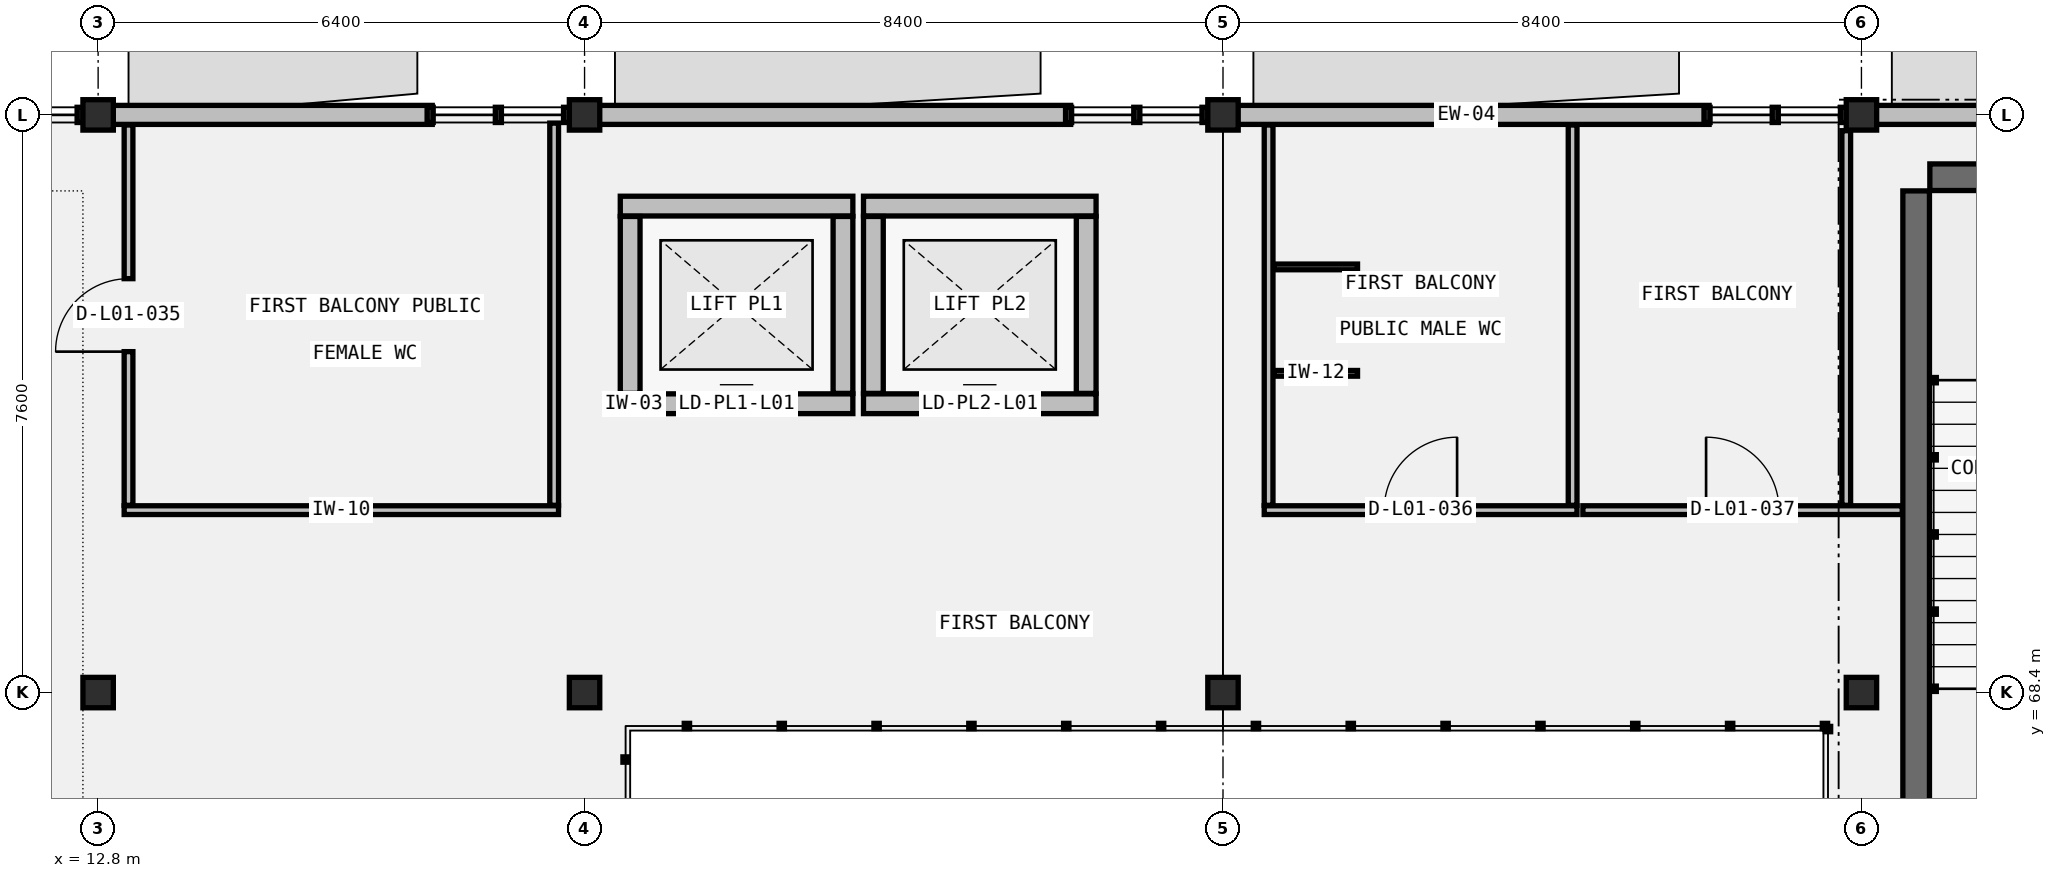
"""IFC4 building model, lengths in metres.
Left out: names, types, materials, properties, quantities, classifications, styles, units other than length and angle.
Written with IfcOpenShell. Run it as: python <this file> out.ifc"""

import sys

from ifc_helpers import new_model, si_unit, direction, frame, frame_2d, origin, origin_2d, place, context, subcontext, project, spatial, rectangle, i_section, extrude, element, fill, save


model = new_model("IFC4")
c1 = context("Model", 3, precision=1e-05, world=origin(), true_north=direction((0.0, 1.0)))
c2 = subcontext(c1, "Body", "Model", "MODEL_VIEW")
j1 = project(units=[si_unit("LENGTHUNIT", "METRE"), si_unit("PLANEANGLEUNIT", "RADIAN")], contexts=[c1])
p1 = place(None, origin())
s1 = spatial("IfcSite", under=j1, at=p1, CompositionType="ELEMENT")
p2 = place(p1, origin())
s2 = spatial("IfcBuilding", under=s1, at=p2, CompositionType="ELEMENT")
p3 = place(p2, frame((0.0, 0.0, 5.4)))
s3 = spatial("IfcBuildingStorey", under=s2, at=p3, CompositionType="ELEMENT", Elevation=5.4)
for number, where, z_axis, x_axis in (
    (1, (12.8, 68.4, 0.0), (0.0, 0.0, 1.0), (1.0, 0.0, 0.0)),
    (2, (12.8, 76.0, 0.0), (0.0, 0.0, 1.0), (1.0, 0.0, 0.0)),
    (3, (19.2, 68.4, 0.0), (0.0, 0.0, 1.0), (1.0, 0.0, 0.0)),
    (4, (19.2, 76.0, 0.0), (0.0, 0.0, 1.0), (1.0, 0.0, 0.0)),
    (5, (27.6, 68.4, 0.0), (0.0, 0.0, 1.0), (1.0, 0.0, 0.0)),
    (6, (27.6, 76.0, 0.0), (0.0, 0.0, 1.0), (1.0, 0.0, 0.0)),
    (7, (36.0, 68.4, 0.0), (0.0, 0.0, 1.0), (1.0, 0.0, 0.0)),
    (8, (36.0, 76.0, 0.0), (0.0, 0.0, 1.0), (1.0, 0.0, 0.0)),
):
    element("IfcColumn", number, at=place(p3, frame(where, z_axis=z_axis, x_axis=x_axis)), inside=s3, PredefinedType="COLUMN", context=c2, shape_type="SweptSolid", body=[
        extrude(i_section(OverallWidth=0.4, OverallDepth=0.4, WebThickness=0.013, FlangeThickness=0.021, FilletRadius=0.022, at=origin_2d()), origin(), (0.0, 0.0, 1.0), 4.6),
    ])
p4 = place(p3, frame((40.2, 75.18, 0.0), z_axis=(0.0, 0.0, 1.0), x_axis=(-1.0, 0.0, 0.0)))
e9 = element("IfcWall", 9, at=p4, inside=s3, PredefinedType="SHEAR", context=c2, shape_type="SweptSolid", body=[
    extrude(rectangle(XDim=3.3, YDim=0.35, at=frame_2d((1.65, 0.0))), origin(), (0.0, 0.0, 1.0), 4.36),
])
p5 = place(p3, frame((36.72, 75.0, 0.0), z_axis=(0.0, 0.0, 1.0), x_axis=(0.0, -1.0, 0.0)))
e10 = element("IfcWall", 10, at=p5, inside=s3, PredefinedType="SHEAR", context=c2, shape_type="SweptSolid", body=[
    extrude(rectangle(XDim=8.15, YDim=0.35, at=frame_2d((4.075, 0.0))), origin(), (0.0, 0.0, 1.0), 4.36),
])
p6 = place(p3, frame((12.81, 76.0, 0.0), z_axis=(0.0, 0.0, 1.0), x_axis=(1.0, 0.0, 0.0)))
e11 = element("IfcWall", 11, at=p6, inside=s3, PredefinedType="STANDARD", context=c2, shape_type="SweptSolid", body=[
    extrude(rectangle(XDim=4.386, YDim=0.25, at=frame_2d((2.193, 0.0))), origin(), (0.0, 0.0, 1.0), 3.438),
])
for number, where, z_axis, x_axis in (
    (12, (19.21, 76.0, 0.0), (0.0, 0.0, 1.0), (1.0, 0.0, 0.0)),
    (13, (27.61, 76.0, 0.0), (0.0, 0.0, 1.0), (1.0, 0.0, 0.0)),
):
    element("IfcWall", number, at=place(p3, frame(where, z_axis=z_axis, x_axis=x_axis)), inside=s3, PredefinedType="STANDARD", context=c2, shape_type="SweptSolid", body=[
        extrude(rectangle(XDim=6.386, YDim=0.25, at=frame_2d((3.193, 0.0))), origin(), (0.0, 0.0, 1.0), 3.438),
    ])
p7 = place(p3, frame((36.01, 76.0, 0.0), z_axis=(0.0, 0.0, 1.0), x_axis=(1.0, 0.0, 0.0)))
e14 = element("IfcWall", 14, at=p7, inside=s3, PredefinedType="STANDARD", context=c2, shape_type="SweptSolid", body=[
    extrude(rectangle(XDim=6.186, YDim=0.25, at=frame_2d((3.093, 0.0))), origin(), (0.0, 0.0, 1.0), 3.85),
])
p8 = place(p3, frame((19.67, 72.2, 0.0), z_axis=(0.0, 0.0, 1.0), x_axis=(1.0, 0.0, 0.0)))
e15 = element("IfcWall", 15, at=p8, inside=s3, PredefinedType="STANDARD", context=c2, shape_type="SweptSolid", body=[
    extrude(rectangle(XDim=3.06, YDim=0.26, at=frame_2d((1.53, 0.0))), origin(), (0.0, 0.0, 1.0), 4.36),
])
p9 = place(p8, frame((0.955, 0.0, 0.0)))
e16 = element("IfcOpeningElement", 16, at=p9, cuts=e15, PredefinedType="OPENING", context=c2, shape_type="SweptSolid", body=[
    extrude(rectangle(XDim=1.15, YDim=2.15, at=frame_2d((0.575, 1.075))), frame((0.0, 0.14, 0.0), z_axis=(0.0, -1.0, 0.0), x_axis=(1.0, 0.0, 0.0)), (0.0, 0.0, 1.0), 0.28),
])
p10 = place(p3, frame((19.67, 74.8, 0.0), z_axis=(0.0, 0.0, 1.0), x_axis=(1.0, 0.0, 0.0)))
e17 = element("IfcWall", 17, at=p10, inside=s3, PredefinedType="STANDARD", context=c2, shape_type="SweptSolid", body=[
    extrude(rectangle(XDim=3.06, YDim=0.26, at=frame_2d((1.53, 0.0))), origin(), (0.0, 0.0, 1.0), 4.36),
])
for number, where, z_axis, x_axis in (
    (18, (19.8, 72.336, 0.0), (0.0, 0.0, 1.0), (0.0, 1.0, 0.0)),
    (19, (22.6, 72.336, 0.0), (0.0, 0.0, 1.0), (0.0, 1.0, 0.0)),
):
    element("IfcWall", number, at=place(p3, frame(where, z_axis=z_axis, x_axis=x_axis)), inside=s3, PredefinedType="STANDARD", context=c2, shape_type="SweptSolid", body=[
        extrude(rectangle(XDim=2.328, YDim=0.26, at=frame_2d((1.164, 0.0))), origin(), (0.0, 0.0, 1.0), 4.36),
    ])
p11 = place(p3, frame((22.87, 72.2, 0.0), z_axis=(0.0, 0.0, 1.0), x_axis=(1.0, 0.0, 0.0)))
e20 = element("IfcWall", 20, at=p11, inside=s3, PredefinedType="STANDARD", context=c2, shape_type="SweptSolid", body=[
    extrude(rectangle(XDim=3.06, YDim=0.26, at=frame_2d((1.53, 0.0))), origin(), (0.0, 0.0, 1.0), 4.36),
])
p12 = place(p11, frame((0.92, 0.0, 0.0)))
e21 = element("IfcOpeningElement", 21, at=p12, cuts=e20, PredefinedType="OPENING", context=c2, shape_type="SweptSolid", body=[
    extrude(rectangle(XDim=1.22, YDim=2.2, at=frame_2d((0.61, 1.1))), frame((0.0, 0.14, 0.0), z_axis=(0.0, -1.0, 0.0), x_axis=(1.0, 0.0, 0.0)), (0.0, 0.0, 1.0), 0.28),
])
p13 = place(p3, frame((22.87, 74.8, 0.0), z_axis=(0.0, 0.0, 1.0), x_axis=(1.0, 0.0, 0.0)))
e22 = element("IfcWall", 22, at=p13, inside=s3, PredefinedType="STANDARD", context=c2, shape_type="SweptSolid", body=[
    extrude(rectangle(XDim=3.06, YDim=0.26, at=frame_2d((1.53, 0.0))), origin(), (0.0, 0.0, 1.0), 4.36),
])
for number, where, z_axis, x_axis in (
    (23, (23.0, 72.336, 0.0), (0.0, 0.0, 1.0), (0.0, 1.0, 0.0)),
    (24, (25.8, 72.336, 0.0), (0.0, 0.0, 1.0), (0.0, 1.0, 0.0)),
):
    element("IfcWall", number, at=place(p3, frame(where, z_axis=z_axis, x_axis=x_axis)), inside=s3, PredefinedType="STANDARD", context=c2, shape_type="SweptSolid", body=[
        extrude(rectangle(XDim=2.328, YDim=0.26, at=frame_2d((1.164, 0.0))), origin(), (0.0, 0.0, 1.0), 4.36),
    ])
p14 = place(p3, frame((13.143, 70.8, 0.0), z_axis=(0.0, 0.0, 1.0), x_axis=(1.0, 0.0, 0.0)))
e25 = element("IfcWall", 25, at=p14, inside=s3, PredefinedType="PARTITIONING", context=c2, shape_type="SweptSolid", body=[
    extrude(rectangle(XDim=5.715, YDim=0.115, at=frame_2d((2.857, 0.0))), origin(), (0.0, 0.0, 1.0), 3.938),
])
p15 = place(p3, frame((13.2, 70.864, 0.0), z_axis=(0.0, 0.0, 1.0), x_axis=(0.0, 1.0, 0.0)))
e26 = element("IfcWall", 26, at=p15, inside=s3, PredefinedType="PARTITIONING", context=c2, shape_type="SweptSolid", body=[
    extrude(rectangle(XDim=5.003, YDim=0.115, at=frame_2d((2.502, 0.0))), origin(), (0.0, 0.0, 1.0), 3.438),
])
p16 = place(p15, frame((2.022, 0.0, 0.0)))
e27 = element("IfcOpeningElement", 27, at=p16, cuts=e26, PredefinedType="OPENING", context=c2, shape_type="SweptSolid", body=[
    extrude(rectangle(XDim=0.96, YDim=2.08, at=frame_2d((0.48, 1.04))), frame((0.0, 0.067, 0.0), z_axis=(0.0, -1.0, 0.0), x_axis=(1.0, 0.0, 0.0)), (0.0, 0.0, 1.0), 0.135),
])
p17 = place(p3, frame((18.8, 70.864, 0.0), z_axis=(0.0, 0.0, 1.0), x_axis=(0.0, 1.0, 0.0)))
e28 = element("IfcWall", 28, at=p17, inside=s3, PredefinedType="PARTITIONING", context=c2, shape_type="SweptSolid", body=[
    extrude(rectangle(XDim=5.029, YDim=0.115, at=frame_2d((2.514, 0.0))), origin(), (0.0, 0.0, 1.0), 3.438),
])
p18 = place(p3, frame((28.143, 70.8, 0.0), z_axis=(0.0, 0.0, 1.0), x_axis=(1.0, 0.0, 0.0)))
e29 = element("IfcWall", 29, at=p18, inside=s3, PredefinedType="PARTITIONING", context=c2, shape_type="SweptSolid", body=[
    extrude(rectangle(XDim=4.115, YDim=0.115, at=frame_2d((2.058, 0.0))), origin(), (0.0, 0.0, 1.0), 3.938),
])
p19 = place(p18, frame((1.577, 0.0, 0.0)))
e30 = element("IfcOpeningElement", 30, at=p19, cuts=e29, PredefinedType="OPENING", context=c2, shape_type="SweptSolid", body=[
    extrude(rectangle(XDim=0.96, YDim=2.08, at=frame_2d((0.48, 1.04))), frame((0.0, 0.067, 0.0), z_axis=(0.0, -1.0, 0.0), x_axis=(1.0, 0.0, 0.0)), (0.0, 0.0, 1.0), 0.135),
])
for number, where, z_axis, x_axis in (
    (31, (28.2, 70.864, 0.0), (0.0, 0.0, 1.0), (0.0, 1.0, 0.0)),
    (32, (32.2, 70.864, 0.0), (0.0, 0.0, 1.0), (0.0, 1.0, 0.0)),
):
    element("IfcWall", number, at=place(p3, frame(where, z_axis=z_axis, x_axis=x_axis)), inside=s3, PredefinedType="PARTITIONING", context=c2, shape_type="SweptSolid", body=[
        extrude(rectangle(XDim=5.003, YDim=0.115, at=frame_2d((2.502, 0.0))), origin(), (0.0, 0.0, 1.0), 3.85),
    ])
p20 = place(p3, frame((32.335, 70.8, 0.0), z_axis=(0.0, 0.0, 1.0), x_axis=(1.0, 0.0, 0.0)))
e33 = element("IfcWall", 33, at=p20, inside=s3, PredefinedType="PARTITIONING", context=c2, shape_type="SweptSolid", body=[
    extrude(rectangle(XDim=4.202, YDim=0.115, at=frame_2d((2.101, 0.0))), origin(), (0.0, 0.0, 1.0), 3.938),
])
p21 = place(p20, frame((1.621, 0.0, 0.0)))
e34 = element("IfcOpeningElement", 34, at=p21, cuts=e33, PredefinedType="OPENING", context=c2, shape_type="SweptSolid", body=[
    extrude(rectangle(XDim=0.96, YDim=2.08, at=frame_2d((0.48, 1.04))), frame((0.0, 0.067, 0.0), z_axis=(0.0, -1.0, 0.0), x_axis=(1.0, 0.0, 0.0)), (0.0, 0.0, 1.0), 0.135),
])
p22 = place(p3, frame((35.8, 70.864, 0.0), z_axis=(0.0, 0.0, 1.0), x_axis=(0.0, 1.0, 0.0)))
e35 = element("IfcWall", 35, at=p22, inside=s3, PredefinedType="PARTITIONING", context=c2, shape_type="SweptSolid", body=[
    extrude(rectangle(XDim=4.928, YDim=0.115, at=frame_2d((2.464, 0.0))), origin(), (0.0, 0.0, 1.0), 3.85),
])
for number, where, z_axis, x_axis in (
    (36, (28.27, 72.6, 0.0), (0.0, 0.0, 1.0), (1.0, 0.0, 0.0)),
    (37, (28.27, 74.0, 0.0), (0.0, 0.0, 1.0), (1.0, 0.0, 0.0)),
):
    element("IfcWall", number, at=place(p3, frame(where, z_axis=z_axis, x_axis=x_axis)), inside=s3, PredefinedType="PARTITIONING", context=c2, shape_type="SweptSolid", body=[
        extrude(rectangle(XDim=1.1, YDim=0.075, at=frame_2d((0.55, 0.0))), origin(), (0.0, 0.0, 1.0), 2.05),
    ])
p23 = place(p9, origin())
e38 = element("IfcDoor", 38, at=p23, inside=s3, OperationType="SLIDING_TO_LEFT", PredefinedType="DOOR", context=c2, shape_type="SweptSolid", body=[
    extrude(rectangle(XDim=1.15, YDim=2.15, at=frame_2d((0.575, 1.075))), frame((0.0, 0.025, 0.0), z_axis=(0.0, -1.0, 0.0), x_axis=(1.0, 0.0, 0.0)), (0.0, 0.0, 1.0), 0.05),
])
fill(e16, e38)
p24 = place(p12, origin())
e39 = element("IfcDoor", 39, at=p24, inside=s3, OperationType="SLIDING_TO_RIGHT", PredefinedType="DOOR", context=c2, shape_type="SweptSolid", body=[
    extrude(rectangle(XDim=1.22, YDim=2.2, at=frame_2d((0.61, 1.1))), frame((0.0, 0.025, 0.0), z_axis=(0.0, -1.0, 0.0), x_axis=(1.0, 0.0, 0.0)), (0.0, 0.0, 1.0), 0.05),
])
fill(e21, e39)
p25 = place(p16, origin())
e40 = element("IfcDoor", 40, at=p25, inside=s3, OperationType="SINGLE_SWING_LEFT", PredefinedType="DOOR", context=c2, shape_type="SweptSolid", body=[
    extrude(rectangle(XDim=0.96, YDim=2.08, at=frame_2d((0.48, 1.04))), frame((0.0, 0.025, 0.0), z_axis=(0.0, -1.0, 0.0), x_axis=(1.0, 0.0, 0.0)), (0.0, 0.0, 1.0), 0.05),
])
fill(e27, e40)
p26 = place(p19, origin())
e41 = element("IfcDoor", 41, at=p26, inside=s3, OperationType="SINGLE_SWING_RIGHT", PredefinedType="DOOR", context=c2, shape_type="SweptSolid", body=[
    extrude(rectangle(XDim=0.96, YDim=2.08, at=frame_2d((0.48, 1.04))), frame((0.0, 0.025, 0.0), z_axis=(0.0, -1.0, 0.0), x_axis=(1.0, 0.0, 0.0)), (0.0, 0.0, 1.0), 0.05),
])
fill(e30, e41)
p27 = place(p21, origin())
e42 = element("IfcDoor", 42, at=p27, inside=s3, OperationType="SINGLE_SWING_LEFT", PredefinedType="DOOR", context=c2, shape_type="SweptSolid", body=[
    extrude(rectangle(XDim=0.96, YDim=2.08, at=frame_2d((0.48, 1.04))), frame((0.0, 0.025, 0.0), z_axis=(0.0, -1.0, 0.0), x_axis=(1.0, 0.0, 0.0)), (0.0, 0.0, 1.0), 0.05),
])
fill(e34, e42)
save(model, sys.argv[1])
